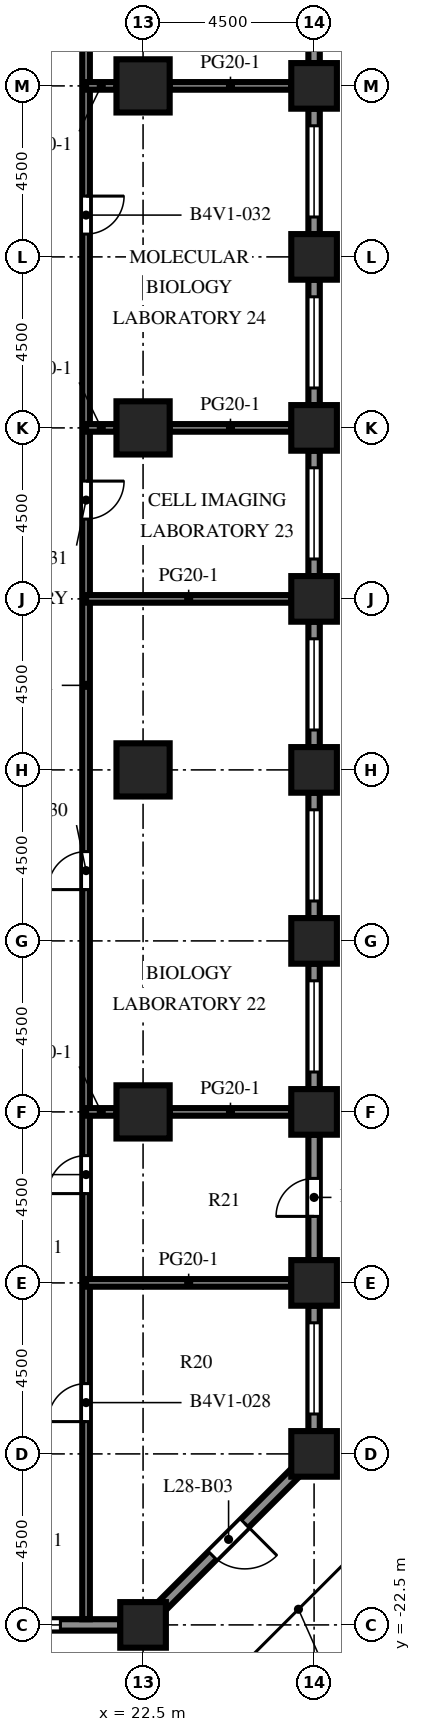
"""IFC4 building model, lengths in metres.
Left out: names, types, materials, properties, quantities, classifications, styles, units other than length and angle.
Written with IfcOpenShell. Run it as: python <this file> out.ifc"""

import sys

from ifc_helpers import new_model, si_unit, direction, frame, frame_2d, origin, origin_2d, place, context, subcontext, project, spatial, rectangle, extrude, element, fill, save


model = new_model("IFC4")
c1 = context("Model", 3, precision=1e-05, world=origin(), true_north=direction((0.0, 1.0)))
c2 = subcontext(c1, "Body", "Model", "MODEL_VIEW")
j1 = project(units=[si_unit("LENGTHUNIT", "METRE"), si_unit("PLANEANGLEUNIT", "RADIAN")], contexts=[c1])
p1 = place(None, origin())
s1 = spatial("IfcSite", under=j1, at=p1, CompositionType="ELEMENT")
p2 = place(p1, origin())
s2 = spatial("IfcBuilding", under=s1, at=p2, CompositionType="ELEMENT")
p3 = place(p2, frame((0.0, 0.0, 124.9)))
s3 = spatial("IfcBuildingStorey", under=s2, at=p3, CompositionType="ELEMENT", Elevation=124.9)
for number, where, z_axis, x_axis in (
    (1, (22.5, -22.5, 0.0), (0.0, 0.0, 1.0), (1.0, 0.0, 0.0)),
    (2, (27.0, -18.0, 0.0), (0.0, 0.0, 1.0), (1.0, 0.0, 0.0)),
    (3, (27.0, -13.5, 0.0), (0.0, 0.0, 1.0), (1.0, 0.0, 0.0)),
    (4, (27.0, -9.0, 0.0), (0.0, 0.0, 1.0), (1.0, 0.0, 0.0)),
    (5, (27.0, -4.5, 0.0), (0.0, 0.0, 1.0), (1.0, 0.0, 0.0)),
    (6, (27.0, 0.0, 0.0), (0.0, 0.0, 1.0), (1.0, 0.0, 0.0)),
    (7, (27.0, 4.5, 0.0), (0.0, 0.0, 1.0), (1.0, 0.0, 0.0)),
    (8, (27.0, 9.0, 0.0), (0.0, 0.0, 1.0), (1.0, 0.0, 0.0)),
    (9, (27.0, 13.5, 0.0), (0.0, 0.0, 1.0), (1.0, 0.0, 0.0)),
    (10, (27.0, 18.0, 0.0), (0.0, 0.0, 1.0), (1.0, 0.0, 0.0)),
):
    element("IfcColumn", number, at=place(p3, frame(where, z_axis=z_axis, x_axis=x_axis)), inside=s3, PredefinedType="COLUMN", context=c2, shape_type="SweptSolid", body=[
        extrude(rectangle(XDim=1.2, YDim=1.2, at=origin_2d()), origin(), (0.0, 0.0, 1.0), 4.1),
    ])
for number, where, z_axis, x_axis in (
    (11, (22.5, -9.0, 0.0), (0.0, 0.0, 1.0), (1.0, 0.0, 0.0)),
    (12, (22.5, 0.0, 0.0), (0.0, 0.0, 1.0), (1.0, 0.0, 0.0)),
    (13, (22.5, 9.0, 0.0), (0.0, 0.0, 1.0), (1.0, 0.0, 0.0)),
    (14, (22.5, 18.0, 0.0), (0.0, 0.0, 1.0), (1.0, 0.0, 0.0)),
):
    element("IfcColumn", number, at=place(p3, frame(where, z_axis=z_axis, x_axis=x_axis)), inside=s3, PredefinedType="COLUMN", context=c2, shape_type="SweptSolid", body=[
        extrude(rectangle(XDim=1.4, YDim=1.4, at=origin_2d()), origin(), (0.0, 0.0, 1.0), 4.1),
    ])
p4 = place(p3, frame((21.9, -22.5, 0.0), z_axis=(0.0, 0.0, 1.0), x_axis=(-1.0, 0.0, 0.0)))
e15 = element("IfcWall", 15, at=p4, inside=s3, PredefinedType="SOLIDWALL", context=c2, shape_type="SweptSolid", body=[
    extrude(rectangle(XDim=3.3, YDim=0.3, at=frame_2d((1.65, 0.0))), origin(), (0.0, 0.0, 1.0), 2.75),
])
p5 = place(p4, frame((1.575, 0.0, 0.8)))
e16 = element("IfcOpeningElement", 16, at=p5, cuts=e15, PredefinedType="OPENING", context=c2, shape_type="SweptSolid", body=[
    extrude(rectangle(XDim=1.2, YDim=1.7, at=frame_2d((0.6, 0.85))), frame((0.0, 0.16, 0.0), z_axis=(0.0, -1.0, 0.0), x_axis=(1.0, 0.0, 0.0)), (0.0, 0.0, 1.0), 0.32),
])
p6 = place(p3, frame((26.506, -18.494, 0.0), z_axis=(0.0, 0.0, 1.0), x_axis=(-0.707106781187, -0.707106781187, 0.0)))
e17 = element("IfcWall", 17, at=p6, inside=s3, PredefinedType="SOLIDWALL", context=c2, shape_type="SweptSolid", body=[
    extrude(rectangle(XDim=4.967, YDim=0.3, at=frame_2d((2.483, 0.0))), origin(), (0.0, 0.0, 1.0), 2.75),
])
p7 = place(p6, frame((1.884, 0.0, 0.0)))
e18 = element("IfcOpeningElement", 18, at=p7, cuts=e17, PredefinedType="OPENING", context=c2, shape_type="SweptSolid", body=[
    extrude(rectangle(XDim=1.2, YDim=2.2, at=frame_2d((0.6, 1.1))), frame((0.0, 0.16, 0.0), z_axis=(0.0, -1.0, 0.0), x_axis=(1.0, 0.0, 0.0)), (0.0, 0.0, 1.0), 0.32),
])
p8 = place(p3, frame((27.0, -14.1, 0.0), z_axis=(0.0, 0.0, 1.0), x_axis=(0.0, -1.0, 0.0)))
e19 = element("IfcWall", 19, at=p8, inside=s3, PredefinedType="SOLIDWALL", context=c2, shape_type="SweptSolid", body=[
    extrude(rectangle(XDim=3.3, YDim=0.3, at=frame_2d((1.65, 0.0))), origin(), (0.0, 0.0, 1.0), 2.75),
])
p9 = place(p8, frame((0.45, 0.0, 0.8)))
e20 = element("IfcOpeningElement", 20, at=p9, cuts=e19, PredefinedType="OPENING", context=c2, shape_type="SweptSolid", body=[
    extrude(rectangle(XDim=2.4, YDim=1.7, at=frame_2d((1.2, 0.85))), frame((0.0, 0.16, 0.0), z_axis=(0.0, -1.0, 0.0), x_axis=(1.0, 0.0, 0.0)), (0.0, 0.0, 1.0), 0.32),
])
p10 = place(p3, frame((27.0, -9.6, 0.0), z_axis=(0.0, 0.0, 1.0), x_axis=(0.0, -1.0, 0.0)))
e21 = element("IfcWall", 21, at=p10, inside=s3, PredefinedType="SOLIDWALL", context=c2, shape_type="SweptSolid", body=[
    extrude(rectangle(XDim=3.3, YDim=0.3, at=frame_2d((1.65, 0.0))), origin(), (0.0, 0.0, 1.0), 2.75),
])
p11 = place(p10, frame((1.15, 0.0, 0.0)))
e22 = element("IfcOpeningElement", 22, at=p11, cuts=e21, PredefinedType="OPENING", context=c2, shape_type="SweptSolid", body=[
    extrude(rectangle(XDim=1.0, YDim=2.2, at=frame_2d((0.5, 1.1))), frame((0.0, 0.16, 0.0), z_axis=(0.0, -1.0, 0.0), x_axis=(1.0, 0.0, 0.0)), (0.0, 0.0, 1.0), 0.32),
])
p12 = place(p3, frame((27.0, -5.1, 0.0), z_axis=(0.0, 0.0, 1.0), x_axis=(0.0, -1.0, 0.0)))
e23 = element("IfcWall", 23, at=p12, inside=s3, PredefinedType="SOLIDWALL", context=c2, shape_type="SweptSolid", body=[
    extrude(rectangle(XDim=3.3, YDim=0.3, at=frame_2d((1.65, 0.0))), origin(), (0.0, 0.0, 1.0), 2.75),
])
p13 = place(p12, frame((0.45, 0.0, 0.8)))
e24 = element("IfcOpeningElement", 24, at=p13, cuts=e23, PredefinedType="OPENING", context=c2, shape_type="SweptSolid", body=[
    extrude(rectangle(XDim=2.4, YDim=1.7, at=frame_2d((1.2, 0.85))), frame((0.0, 0.16, 0.0), z_axis=(0.0, -1.0, 0.0), x_axis=(1.0, 0.0, 0.0)), (0.0, 0.0, 1.0), 0.32),
])
p14 = place(p3, frame((27.0, -0.6, 0.0), z_axis=(0.0, 0.0, 1.0), x_axis=(0.0, -1.0, 0.0)))
e25 = element("IfcWall", 25, at=p14, inside=s3, PredefinedType="SOLIDWALL", context=c2, shape_type="SweptSolid", body=[
    extrude(rectangle(XDim=3.3, YDim=0.3, at=frame_2d((1.65, 0.0))), origin(), (0.0, 0.0, 1.0), 2.75),
])
p15 = place(p14, frame((0.45, 0.0, 0.8)))
e26 = element("IfcOpeningElement", 26, at=p15, cuts=e25, PredefinedType="OPENING", context=c2, shape_type="SweptSolid", body=[
    extrude(rectangle(XDim=2.4, YDim=1.7, at=frame_2d((1.2, 0.85))), frame((0.0, 0.16, 0.0), z_axis=(0.0, -1.0, 0.0), x_axis=(1.0, 0.0, 0.0)), (0.0, 0.0, 1.0), 0.32),
])
p16 = place(p3, frame((27.0, 3.9, 0.0), z_axis=(0.0, 0.0, 1.0), x_axis=(0.0, -1.0, 0.0)))
e27 = element("IfcWall", 27, at=p16, inside=s3, PredefinedType="SOLIDWALL", context=c2, shape_type="SweptSolid", body=[
    extrude(rectangle(XDim=3.3, YDim=0.3, at=frame_2d((1.65, 0.0))), origin(), (0.0, 0.0, 1.0), 2.75),
])
p17 = place(p16, frame((0.45, 0.0, 0.8)))
e28 = element("IfcOpeningElement", 28, at=p17, cuts=e27, PredefinedType="OPENING", context=c2, shape_type="SweptSolid", body=[
    extrude(rectangle(XDim=2.4, YDim=1.7, at=frame_2d((1.2, 0.85))), frame((0.0, 0.16, 0.0), z_axis=(0.0, -1.0, 0.0), x_axis=(1.0, 0.0, 0.0)), (0.0, 0.0, 1.0), 0.32),
])
p18 = place(p3, frame((27.0, 8.4, 0.0), z_axis=(0.0, 0.0, 1.0), x_axis=(0.0, -1.0, 0.0)))
e29 = element("IfcWall", 29, at=p18, inside=s3, PredefinedType="SOLIDWALL", context=c2, shape_type="SweptSolid", body=[
    extrude(rectangle(XDim=3.3, YDim=0.3, at=frame_2d((1.65, 0.0))), origin(), (0.0, 0.0, 1.0), 2.75),
])
p19 = place(p18, frame((0.45, 0.0, 0.8)))
e30 = element("IfcOpeningElement", 30, at=p19, cuts=e29, PredefinedType="OPENING", context=c2, shape_type="SweptSolid", body=[
    extrude(rectangle(XDim=2.4, YDim=1.7, at=frame_2d((1.2, 0.85))), frame((0.0, 0.16, 0.0), z_axis=(0.0, -1.0, 0.0), x_axis=(1.0, 0.0, 0.0)), (0.0, 0.0, 1.0), 0.32),
])
p20 = place(p3, frame((27.0, 12.9, 0.0), z_axis=(0.0, 0.0, 1.0), x_axis=(0.0, -1.0, 0.0)))
e31 = element("IfcWall", 31, at=p20, inside=s3, PredefinedType="SOLIDWALL", context=c2, shape_type="SweptSolid", body=[
    extrude(rectangle(XDim=3.3, YDim=0.3, at=frame_2d((1.65, 0.0))), origin(), (0.0, 0.0, 1.0), 2.75),
])
p21 = place(p20, frame((0.45, 0.0, 0.8)))
e32 = element("IfcOpeningElement", 32, at=p21, cuts=e31, PredefinedType="OPENING", context=c2, shape_type="SweptSolid", body=[
    extrude(rectangle(XDim=2.4, YDim=1.7, at=frame_2d((1.2, 0.85))), frame((0.0, 0.16, 0.0), z_axis=(0.0, -1.0, 0.0), x_axis=(1.0, 0.0, 0.0)), (0.0, 0.0, 1.0), 0.32),
])
p22 = place(p3, frame((27.0, 17.4, 0.0), z_axis=(0.0, 0.0, 1.0), x_axis=(0.0, -1.0, 0.0)))
e33 = element("IfcWall", 33, at=p22, inside=s3, PredefinedType="SOLIDWALL", context=c2, shape_type="SweptSolid", body=[
    extrude(rectangle(XDim=3.3, YDim=0.3, at=frame_2d((1.65, 0.0))), origin(), (0.0, 0.0, 1.0), 2.75),
])
p23 = place(p22, frame((0.45, 0.0, 0.8)))
e34 = element("IfcOpeningElement", 34, at=p23, cuts=e33, PredefinedType="OPENING", context=c2, shape_type="SweptSolid", body=[
    extrude(rectangle(XDim=2.4, YDim=1.7, at=frame_2d((1.2, 0.85))), frame((0.0, 0.16, 0.0), z_axis=(0.0, -1.0, 0.0), x_axis=(1.0, 0.0, 0.0)), (0.0, 0.0, 1.0), 0.32),
])
p24 = place(p3, frame((27.0, 21.9, 0.0), z_axis=(0.0, 0.0, 1.0), x_axis=(0.0, -1.0, 0.0)))
e35 = element("IfcWall", 35, at=p24, inside=s3, PredefinedType="SOLIDWALL", context=c2, shape_type="SweptSolid", body=[
    extrude(rectangle(XDim=3.3, YDim=0.3, at=frame_2d((1.65, 0.0))), origin(), (0.0, 0.0, 1.0), 2.75),
])
p25 = place(p24, frame((1.15, 0.0, 0.0)))
e36 = element("IfcOpeningElement", 36, at=p25, cuts=e35, PredefinedType="OPENING", context=c2, shape_type="SweptSolid", body=[
    extrude(rectangle(XDim=1.0, YDim=2.2, at=frame_2d((0.5, 1.1))), frame((0.0, 0.16, 0.0), z_axis=(0.0, -1.0, 0.0), x_axis=(1.0, 0.0, 0.0)), (0.0, 0.0, 1.0), 0.32),
])
p26 = place(p3, frame((21.0, 31.35, 0.0), z_axis=(0.0, 0.0, 1.0), x_axis=(0.0, -1.0, 0.0)))
e37 = element("IfcWall", 37, at=p26, inside=s3, PredefinedType="PARTITIONING", context=c2, shape_type="SweptSolid", body=[
    extrude(rectangle(XDim=53.7, YDim=0.2, at=frame_2d((26.85, 0.0))), origin(), (0.0, 0.0, 1.0), 3.65),
])
p27 = place(p26, frame((47.5, 0.0, 0.0)))
e38 = element("IfcOpeningElement", 38, at=p27, cuts=e37, PredefinedType="OPENING", context=c2, shape_type="SweptSolid", body=[
    extrude(rectangle(XDim=1.0, YDim=2.1, at=frame_2d((0.5, 1.05))), frame((0.0, 0.11, 0.0), z_axis=(0.0, -1.0, 0.0), x_axis=(1.0, 0.0, 0.0)), (0.0, 0.0, 1.0), 0.22),
])
p28 = place(p26, frame((41.5, 0.0, 0.0)))
e39 = element("IfcOpeningElement", 39, at=p28, cuts=e37, PredefinedType="OPENING", context=c2, shape_type="SweptSolid", body=[
    extrude(rectangle(XDim=1.0, YDim=2.1, at=frame_2d((0.5, 1.05))), frame((0.0, 0.11, 0.0), z_axis=(0.0, -1.0, 0.0), x_axis=(1.0, 0.0, 0.0)), (0.0, 0.0, 1.0), 0.22),
])
p29 = place(p26, frame((33.5, 0.0, 0.0)))
e40 = element("IfcOpeningElement", 40, at=p29, cuts=e37, PredefinedType="OPENING", context=c2, shape_type="SweptSolid", body=[
    extrude(rectangle(XDim=1.0, YDim=2.1, at=frame_2d((0.5, 1.05))), frame((0.0, 0.11, 0.0), z_axis=(0.0, -1.0, 0.0), x_axis=(1.0, 0.0, 0.0)), (0.0, 0.0, 1.0), 0.22),
])
p30 = place(p26, frame((23.75, 0.0, 0.0)))
e41 = element("IfcOpeningElement", 41, at=p30, cuts=e37, PredefinedType="OPENING", context=c2, shape_type="SweptSolid", body=[
    extrude(rectangle(XDim=1.0, YDim=2.1, at=frame_2d((0.5, 1.05))), frame((0.0, 0.11, 0.0), z_axis=(0.0, -1.0, 0.0), x_axis=(1.0, 0.0, 0.0)), (0.0, 0.0, 1.0), 0.22),
])
p31 = place(p26, frame((16.25, 0.0, 0.0)))
e42 = element("IfcOpeningElement", 42, at=p31, cuts=e37, PredefinedType="OPENING", context=c2, shape_type="SweptSolid", body=[
    extrude(rectangle(XDim=1.0, YDim=2.1, at=frame_2d((0.5, 1.05))), frame((0.0, 0.11, 0.0), z_axis=(0.0, -1.0, 0.0), x_axis=(1.0, 0.0, 0.0)), (0.0, 0.0, 1.0), 0.22),
])
p32 = place(p26, frame((11.0, 0.0, 0.0)))
e43 = element("IfcOpeningElement", 43, at=p32, cuts=e37, PredefinedType="OPENING", context=c2, shape_type="SweptSolid", body=[
    extrude(rectangle(XDim=1.0, YDim=2.1, at=frame_2d((0.5, 1.05))), frame((0.0, 0.11, 0.0), z_axis=(0.0, -1.0, 0.0), x_axis=(1.0, 0.0, 0.0)), (0.0, 0.0, 1.0), 0.22),
])
p33 = place(p26, frame((6.75, 0.0, 0.0)))
e44 = element("IfcOpeningElement", 44, at=p33, cuts=e37, PredefinedType="OPENING", context=c2, shape_type="SweptSolid", body=[
    extrude(rectangle(XDim=1.0, YDim=2.1, at=frame_2d((0.5, 1.05))), frame((0.0, 0.11, 0.0), z_axis=(0.0, -1.0, 0.0), x_axis=(1.0, 0.0, 0.0)), (0.0, 0.0, 1.0), 0.22),
])
p34 = place(p26, frame((2.0, 0.0, 0.0)))
e45 = element("IfcOpeningElement", 45, at=p34, cuts=e37, PredefinedType="OPENING", context=c2, shape_type="SweptSolid", body=[
    extrude(rectangle(XDim=1.0, YDim=2.1, at=frame_2d((0.5, 1.05))), frame((0.0, 0.11, 0.0), z_axis=(0.0, -1.0, 0.0), x_axis=(1.0, 0.0, 0.0)), (0.0, 0.0, 1.0), 0.22),
])
p35 = place(p3, frame((21.0, -13.5, 0.0), z_axis=(0.0, 0.0, 1.0), x_axis=(1.0, 0.0, 0.0)))
e46 = element("IfcWall", 46, at=p35, inside=s3, PredefinedType="PARTITIONING", context=c2, shape_type="SweptSolid", body=[
    extrude(rectangle(XDim=5.4, YDim=0.2, at=frame_2d((2.7, 0.0))), origin(), (0.0, 0.0, 1.0), 3.65),
])
p36 = place(p3, frame((21.0, -9.0, 0.0), z_axis=(0.0, 0.0, 1.0), x_axis=(1.0, 0.0, 0.0)))
e47 = element("IfcWall", 47, at=p36, inside=s3, PredefinedType="PARTITIONING", context=c2, shape_type="SweptSolid", body=[
    extrude(rectangle(XDim=0.8, YDim=0.2, at=frame_2d((0.4, 0.0))), origin(), (0.0, 0.0, 1.0), 3.65),
])
p37 = place(p3, frame((23.2, -9.0, 0.0), z_axis=(0.0, 0.0, 1.0), x_axis=(1.0, 0.0, 0.0)))
e48 = element("IfcWall", 48, at=p37, inside=s3, PredefinedType="PARTITIONING", context=c2, shape_type="SweptSolid", body=[
    extrude(rectangle(XDim=3.2, YDim=0.2, at=frame_2d((1.6, 0.0))), origin(), (0.0, 0.0, 1.0), 3.65),
])
p38 = place(p3, frame((21.0, 4.5, 0.0), z_axis=(0.0, 0.0, 1.0), x_axis=(1.0, 0.0, 0.0)))
e49 = element("IfcWall", 49, at=p38, inside=s3, PredefinedType="PARTITIONING", context=c2, shape_type="SweptSolid", body=[
    extrude(rectangle(XDim=5.4, YDim=0.2, at=frame_2d((2.7, 0.0))), origin(), (0.0, 0.0, 1.0), 3.65),
])
p39 = place(p3, frame((21.0, 9.0, 0.0), z_axis=(0.0, 0.0, 1.0), x_axis=(1.0, 0.0, 0.0)))
e50 = element("IfcWall", 50, at=p39, inside=s3, PredefinedType="PARTITIONING", context=c2, shape_type="SweptSolid", body=[
    extrude(rectangle(XDim=0.8, YDim=0.2, at=frame_2d((0.4, 0.0))), origin(), (0.0, 0.0, 1.0), 3.65),
])
p40 = place(p3, frame((23.2, 9.0, 0.0), z_axis=(0.0, 0.0, 1.0), x_axis=(1.0, 0.0, 0.0)))
e51 = element("IfcWall", 51, at=p40, inside=s3, PredefinedType="PARTITIONING", context=c2, shape_type="SweptSolid", body=[
    extrude(rectangle(XDim=3.2, YDim=0.2, at=frame_2d((1.6, 0.0))), origin(), (0.0, 0.0, 1.0), 3.65),
])
p41 = place(p3, frame((21.0, 18.0, 0.0), z_axis=(0.0, 0.0, 1.0), x_axis=(1.0, 0.0, 0.0)))
e52 = element("IfcWall", 52, at=p41, inside=s3, PredefinedType="PARTITIONING", context=c2, shape_type="SweptSolid", body=[
    extrude(rectangle(XDim=0.8, YDim=0.2, at=frame_2d((0.4, 0.0))), origin(), (0.0, 0.0, 1.0), 3.65),
])
p42 = place(p3, frame((23.2, 18.0, 0.0), z_axis=(0.0, 0.0, 1.0), x_axis=(1.0, 0.0, 0.0)))
e53 = element("IfcWall", 53, at=p42, inside=s3, PredefinedType="PARTITIONING", context=c2, shape_type="SweptSolid", body=[
    extrude(rectangle(XDim=3.2, YDim=0.2, at=frame_2d((1.6, 0.0))), origin(), (0.0, 0.0, 1.0), 3.65),
])
p43 = place(p5, origin())
e54 = element("IfcWindow", 54, at=p43, inside=s3, PartitioningType="SINGLE_PANEL", PredefinedType="WINDOW", context=c2, shape_type="SweptSolid", body=[
    extrude(rectangle(XDim=1.2, YDim=1.7, at=frame_2d((0.6, 0.85))), frame((0.0, 0.03, 0.0), z_axis=(0.0, -1.0, 0.0), x_axis=(1.0, 0.0, 0.0)), (0.0, 0.0, 1.0), 0.06),
])
fill(e16, e54)
p44 = place(p7, origin())
e55 = element("IfcDoor", 55, at=p44, inside=s3, OperationType="SINGLE_SWING_LEFT", PredefinedType="DOOR", context=c2, shape_type="SweptSolid", body=[
    extrude(rectangle(XDim=1.2, YDim=2.2, at=frame_2d((0.6, 1.1))), frame((0.0, 0.025, 0.0), z_axis=(0.0, -1.0, 0.0), x_axis=(1.0, 0.0, 0.0)), (0.0, 0.0, 1.0), 0.05),
])
fill(e18, e55)
p45 = place(p9, origin())
e56 = element("IfcWindow", 56, at=p45, inside=s3, PartitioningType="SINGLE_PANEL", PredefinedType="WINDOW", context=c2, shape_type="SweptSolid", body=[
    extrude(rectangle(XDim=2.4, YDim=1.7, at=frame_2d((1.2, 0.85))), frame((0.0, 0.03, 0.0), z_axis=(0.0, -1.0, 0.0), x_axis=(1.0, 0.0, 0.0)), (0.0, 0.0, 1.0), 0.06),
])
fill(e20, e56)
p46 = place(p11, origin())
e57 = element("IfcDoor", 57, at=p46, inside=s3, OperationType="SINGLE_SWING_RIGHT", PredefinedType="DOOR", context=c2, shape_type="SweptSolid", body=[
    extrude(rectangle(XDim=1.0, YDim=2.2, at=frame_2d((0.5, 1.1))), frame((0.0, 0.025, 0.0), z_axis=(0.0, -1.0, 0.0), x_axis=(1.0, 0.0, 0.0)), (0.0, 0.0, 1.0), 0.05),
])
fill(e22, e57)
p47 = place(p13, origin())
e58 = element("IfcWindow", 58, at=p47, inside=s3, PartitioningType="SINGLE_PANEL", PredefinedType="WINDOW", context=c2, shape_type="SweptSolid", body=[
    extrude(rectangle(XDim=2.4, YDim=1.7, at=frame_2d((1.2, 0.85))), frame((0.0, 0.03, 0.0), z_axis=(0.0, -1.0, 0.0), x_axis=(1.0, 0.0, 0.0)), (0.0, 0.0, 1.0), 0.06),
])
fill(e24, e58)
p48 = place(p15, origin())
e59 = element("IfcWindow", 59, at=p48, inside=s3, PartitioningType="SINGLE_PANEL", PredefinedType="WINDOW", context=c2, shape_type="SweptSolid", body=[
    extrude(rectangle(XDim=2.4, YDim=1.7, at=frame_2d((1.2, 0.85))), frame((0.0, 0.03, 0.0), z_axis=(0.0, -1.0, 0.0), x_axis=(1.0, 0.0, 0.0)), (0.0, 0.0, 1.0), 0.06),
])
fill(e26, e59)
p49 = place(p17, origin())
e60 = element("IfcWindow", 60, at=p49, inside=s3, PartitioningType="SINGLE_PANEL", PredefinedType="WINDOW", context=c2, shape_type="SweptSolid", body=[
    extrude(rectangle(XDim=2.4, YDim=1.7, at=frame_2d((1.2, 0.85))), frame((0.0, 0.03, 0.0), z_axis=(0.0, -1.0, 0.0), x_axis=(1.0, 0.0, 0.0)), (0.0, 0.0, 1.0), 0.06),
])
fill(e28, e60)
p50 = place(p19, origin())
e61 = element("IfcWindow", 61, at=p50, inside=s3, PartitioningType="SINGLE_PANEL", PredefinedType="WINDOW", context=c2, shape_type="SweptSolid", body=[
    extrude(rectangle(XDim=2.4, YDim=1.7, at=frame_2d((1.2, 0.85))), frame((0.0, 0.03, 0.0), z_axis=(0.0, -1.0, 0.0), x_axis=(1.0, 0.0, 0.0)), (0.0, 0.0, 1.0), 0.06),
])
fill(e30, e61)
p51 = place(p21, origin())
e62 = element("IfcWindow", 62, at=p51, inside=s3, PartitioningType="SINGLE_PANEL", PredefinedType="WINDOW", context=c2, shape_type="SweptSolid", body=[
    extrude(rectangle(XDim=2.4, YDim=1.7, at=frame_2d((1.2, 0.85))), frame((0.0, 0.03, 0.0), z_axis=(0.0, -1.0, 0.0), x_axis=(1.0, 0.0, 0.0)), (0.0, 0.0, 1.0), 0.06),
])
fill(e32, e62)
p52 = place(p23, origin())
e63 = element("IfcWindow", 63, at=p52, inside=s3, PartitioningType="SINGLE_PANEL", PredefinedType="WINDOW", context=c2, shape_type="SweptSolid", body=[
    extrude(rectangle(XDim=2.4, YDim=1.7, at=frame_2d((1.2, 0.85))), frame((0.0, 0.03, 0.0), z_axis=(0.0, -1.0, 0.0), x_axis=(1.0, 0.0, 0.0)), (0.0, 0.0, 1.0), 0.06),
])
fill(e34, e63)
p53 = place(p27, origin())
e64 = element("IfcDoor", 64, at=p53, inside=s3, OperationType="SINGLE_SWING_RIGHT", PredefinedType="DOOR", context=c2, shape_type="SweptSolid", body=[
    extrude(rectangle(XDim=1.0, YDim=2.1, at=frame_2d((0.5, 1.05))), frame((0.0, 0.025, 0.0), z_axis=(0.0, -1.0, 0.0), x_axis=(1.0, 0.0, 0.0)), (0.0, 0.0, 1.0), 0.05),
])
fill(e38, e64)
p54 = place(p28, origin())
e65 = element("IfcDoor", 65, at=p54, inside=s3, OperationType="SINGLE_SWING_RIGHT", PredefinedType="DOOR", context=c2, shape_type="SweptSolid", body=[
    extrude(rectangle(XDim=1.0, YDim=2.1, at=frame_2d((0.5, 1.05))), frame((0.0, 0.025, 0.0), z_axis=(0.0, -1.0, 0.0), x_axis=(1.0, 0.0, 0.0)), (0.0, 0.0, 1.0), 0.05),
])
fill(e39, e65)
p55 = place(p29, origin())
e66 = element("IfcDoor", 66, at=p55, inside=s3, OperationType="SINGLE_SWING_RIGHT", PredefinedType="DOOR", context=c2, shape_type="SweptSolid", body=[
    extrude(rectangle(XDim=1.0, YDim=2.1, at=frame_2d((0.5, 1.05))), frame((0.0, 0.025, 0.0), z_axis=(0.0, -1.0, 0.0), x_axis=(1.0, 0.0, 0.0)), (0.0, 0.0, 1.0), 0.05),
])
fill(e40, e66)
p56 = place(p30, origin())
e67 = element("IfcDoor", 67, at=p56, inside=s3, OperationType="SINGLE_SWING_LEFT", PredefinedType="DOOR", context=c2, shape_type="SweptSolid", body=[
    extrude(rectangle(XDim=1.0, YDim=2.1, at=frame_2d((0.5, 1.05))), frame((0.0, 0.025, 0.0), z_axis=(0.0, -1.0, 0.0), x_axis=(1.0, 0.0, 0.0)), (0.0, 0.0, 1.0), 0.05),
])
fill(e41, e67)
p57 = place(p31, origin())
e68 = element("IfcDoor", 68, at=p57, inside=s3, OperationType="SINGLE_SWING_LEFT", PredefinedType="DOOR", context=c2, shape_type="SweptSolid", body=[
    extrude(rectangle(XDim=1.0, YDim=2.1, at=frame_2d((0.5, 1.05))), frame((0.0, 0.025, 0.0), z_axis=(0.0, -1.0, 0.0), x_axis=(1.0, 0.0, 0.0)), (0.0, 0.0, 1.0), 0.05),
])
fill(e42, e68)
save(model, sys.argv[1])
